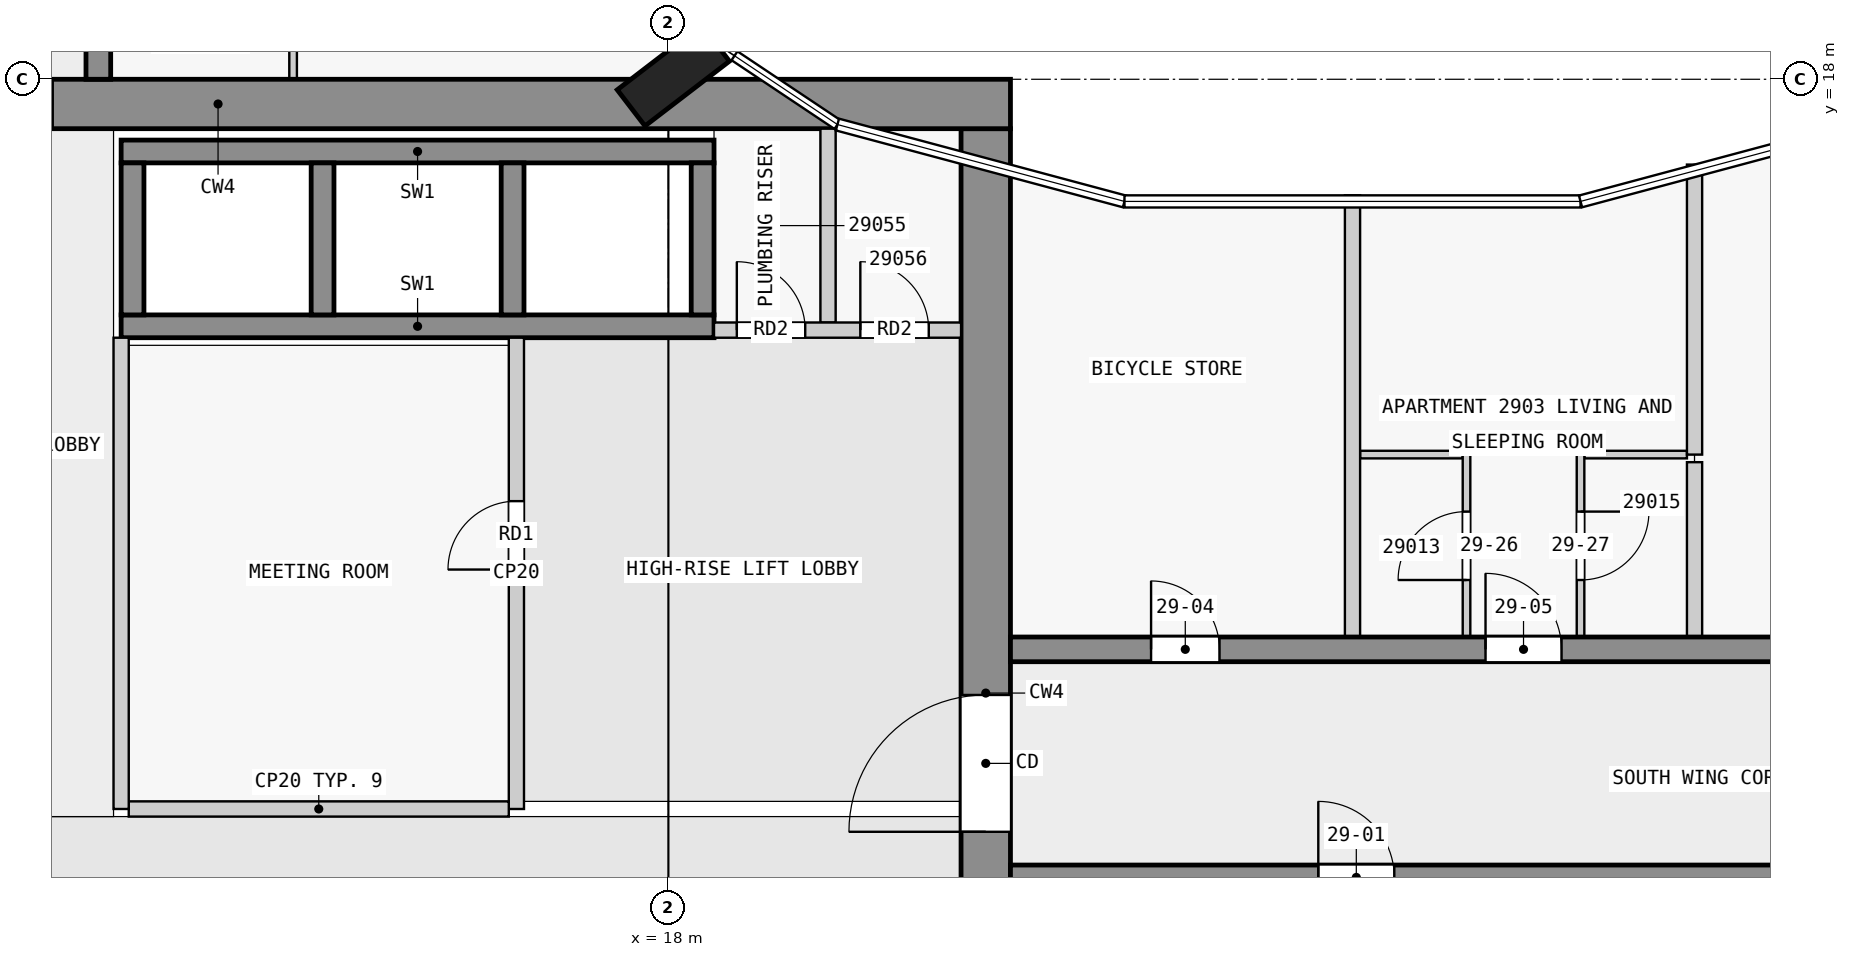
"""IFC4 building model, lengths in metres.
Left out: names, types, materials, properties, quantities, classifications, styles, units other than length and angle.
Written with IfcOpenShell. Run it as: python <this file> out.ifc"""

import sys

from ifc_helpers import new_model, si_unit, direction, frame, frame_2d, origin, origin_2d, place, context, subcontext, project, spatial, rectangle, extrude, element, fill, save


model = new_model("IFC4")
c1 = context("Model", 3, precision=1e-05, world=origin(), true_north=direction((0.0, 1.0)))
c2 = subcontext(c1, "Body", "Model", "MODEL_VIEW")
j1 = project(units=[si_unit("LENGTHUNIT", "METRE"), si_unit("PLANEANGLEUNIT", "RADIAN")], contexts=[c1])
p1 = place(None, origin())
s1 = spatial("IfcSite", under=j1, at=p1, CompositionType="ELEMENT")
p2 = place(p1, origin())
s2 = spatial("IfcBuilding", under=s1, at=p2, CompositionType="ELEMENT")
p3 = place(p2, frame((0.0, 0.0, 113.3)))
s3 = spatial("IfcBuildingStorey", under=s2, at=p3, CompositionType="ELEMENT", Elevation=113.3)
p4 = place(p3, frame((18.065, 18.05, 0.0), z_axis=(0.0, 0.0, 1.0), x_axis=(-0.608810846443, 0.793315418515, 0.0)))
e1 = element("IfcColumn", 1, at=p4, inside=s3, PredefinedType="COLUMN", context=c2, shape_type="SweptSolid", body=[
    extrude(rectangle(XDim=0.6, YDim=1.4, at=origin_2d()), origin(), (0.0, 0.0, 1.0), 3.5),
])
p5 = place(p3, frame((1.65, 17.675, 0.0), z_axis=(0.0, 0.0, 1.0), x_axis=(1.0, 0.0, 0.0)))
e2 = element("IfcWall", 2, at=p5, inside=s3, PredefinedType="SHEAR", context=c2, shape_type="SweptSolid", body=[
    extrude(rectangle(XDim=20.85, YDim=0.65, at=frame_2d((10.425, 0.0))), origin(), (0.0, 0.0, 1.0), 3.25),
])
p6 = place(p5, frame((6.45, 0.0, 0.0)))
e3 = element("IfcOpeningElement", 3, at=p6, cuts=e2, PredefinedType="OPENING", context=c2, shape_type="SweptSolid", body=[
    extrude(rectangle(XDim=1.8, YDim=2.1, at=frame_2d((0.9, 1.05))), frame((0.0, 0.335, 0.0), z_axis=(0.0, -1.0, 0.0), x_axis=(1.0, 0.0, 0.0)), (0.0, 0.0, 1.0), 0.67),
])
p7 = place(p3, frame((22.175, 2.5, 0.0), z_axis=(0.0, 0.0, 1.0), x_axis=(0.0, 1.0, 0.0)))
e4 = element("IfcWall", 4, at=p7, inside=s3, PredefinedType="SHEAR", context=c2, shape_type="SweptSolid", body=[
    extrude(rectangle(XDim=14.85, YDim=0.65, at=frame_2d((7.425, 0.0))), origin(), (0.0, 0.0, 1.0), 3.25),
])
p8 = place(p7, frame((5.6, 0.0, 0.0)))
e5 = element("IfcOpeningElement", 5, at=p8, cuts=e4, PredefinedType="OPENING", context=c2, shape_type="SweptSolid", body=[
    extrude(rectangle(XDim=1.8, YDim=2.1, at=frame_2d((0.9, 1.05))), frame((0.0, 0.335, 0.0), z_axis=(0.0, -1.0, 0.0), x_axis=(1.0, 0.0, 0.0)), (0.0, 0.0, 1.0), 0.67),
])
for number, where, z_axis, x_axis in (
    (6, (10.8, 17.05, 0.0), (0.0, 0.0, 1.0), (1.0, 0.0, 0.0)),
    (7, (10.8, 14.75, 0.0), (0.0, 0.0, 1.0), (1.0, 0.0, 0.0)),
):
    element("IfcWall", number, at=place(p3, frame(where, z_axis=z_axis, x_axis=x_axis)), inside=s3, PredefinedType="SHEAR", context=c2, shape_type="SweptSolid", body=[
        extrude(rectangle(XDim=7.8, YDim=0.3, at=frame_2d((3.9, 0.0))), origin(), (0.0, 0.0, 1.0), 3.25),
    ])
for number, where, z_axis, x_axis in (
    (8, (10.95, 14.9, 0.0), (0.0, 0.0, 1.0), (0.0, 1.0, 0.0)),
    (9, (13.45, 14.9, 0.0), (0.0, 0.0, 1.0), (0.0, 1.0, 0.0)),
    (10, (15.95, 14.9, 0.0), (0.0, 0.0, 1.0), (0.0, 1.0, 0.0)),
    (11, (18.45, 14.9, 0.0), (0.0, 0.0, 1.0), (0.0, 1.0, 0.0)),
):
    element("IfcWall", number, at=place(p3, frame(where, z_axis=z_axis, x_axis=x_axis)), inside=s3, PredefinedType="SHEAR", context=c2, shape_type="SweptSolid", body=[
        extrude(rectangle(XDim=2.0, YDim=0.3, at=frame_2d((1.0, 0.0))), origin(), (0.0, 0.0, 1.0), 3.25),
    ])
p9 = place(p3, frame((22.5, 7.5, 0.0), z_axis=(0.0, 0.0, 1.0), x_axis=(1.0, 0.0, 0.0)))
e12 = element("IfcWall", 12, at=p9, inside=s3, PredefinedType="SHEAR", context=c2, shape_type="SweptSolid", body=[
    extrude(rectangle(XDim=22.5, YDim=0.325, at=frame_2d((11.25, 0.0))), origin(), (0.0, 0.0, 1.0), 3.25),
])
p10 = place(p9, frame((4.05, 0.0, 0.0)))
e13 = element("IfcOpeningElement", 13, at=p10, cuts=e12, PredefinedType="OPENING", context=c2, shape_type="SweptSolid", body=[
    extrude(rectangle(XDim=1.0, YDim=2.1, at=frame_2d((0.5, 1.05))), frame((0.0, 0.172, 0.0), z_axis=(0.0, -1.0, 0.0), x_axis=(1.0, 0.0, 0.0)), (0.0, 0.0, 1.0), 0.345),
])
p11 = place(p9, frame((10.75, 0.0, 0.0)))
e14 = element("IfcOpeningElement", 14, at=p11, cuts=e12, PredefinedType="OPENING", context=c2, shape_type="SweptSolid", body=[
    extrude(rectangle(XDim=1.0, YDim=2.1, at=frame_2d((0.5, 1.05))), frame((0.0, 0.172, 0.0), z_axis=(0.0, -1.0, 0.0), x_axis=(1.0, 0.0, 0.0)), (0.0, 0.0, 1.0), 0.345),
])
p12 = place(p9, frame((16.85, 0.0, 0.0)))
e15 = element("IfcOpeningElement", 15, at=p12, cuts=e12, PredefinedType="OPENING", context=c2, shape_type="SweptSolid", body=[
    extrude(rectangle(XDim=1.0, YDim=2.1, at=frame_2d((0.5, 1.05))), frame((0.0, 0.172, 0.0), z_axis=(0.0, -1.0, 0.0), x_axis=(1.0, 0.0, 0.0)), (0.0, 0.0, 1.0), 0.345),
])
p13 = place(p3, frame((22.5, 10.5, 0.0), z_axis=(0.0, 0.0, 1.0), x_axis=(1.0, 0.0, 0.0)))
e16 = element("IfcWall", 16, at=p13, inside=s3, PredefinedType="SHEAR", context=c2, shape_type="SweptSolid", body=[
    extrude(rectangle(XDim=22.5, YDim=0.325, at=frame_2d((11.25, 0.0))), origin(), (0.0, 0.0, 1.0), 3.25),
])
p14 = place(p13, frame((1.85, 0.0, 0.0)))
e17 = element("IfcOpeningElement", 17, at=p14, cuts=e16, PredefinedType="OPENING", context=c2, shape_type="SweptSolid", body=[
    extrude(rectangle(XDim=0.9, YDim=2.1, at=frame_2d((0.45, 1.05))), frame((0.0, 0.172, 0.0), z_axis=(0.0, -1.0, 0.0), x_axis=(1.0, 0.0, 0.0)), (0.0, 0.0, 1.0), 0.345),
])
p15 = place(p13, frame((6.25, 0.0, 0.0)))
e18 = element("IfcOpeningElement", 18, at=p15, cuts=e16, PredefinedType="OPENING", context=c2, shape_type="SweptSolid", body=[
    extrude(rectangle(XDim=1.0, YDim=2.1, at=frame_2d((0.5, 1.05))), frame((0.0, 0.172, 0.0), z_axis=(0.0, -1.0, 0.0), x_axis=(1.0, 0.0, 0.0)), (0.0, 0.0, 1.0), 0.345),
])
p16 = place(p13, frame((13.05, 0.0, 0.0)))
e19 = element("IfcOpeningElement", 19, at=p16, cuts=e16, PredefinedType="OPENING", context=c2, shape_type="SweptSolid", body=[
    extrude(rectangle(XDim=1.0, YDim=2.1, at=frame_2d((0.5, 1.05))), frame((0.0, 0.172, 0.0), z_axis=(0.0, -1.0, 0.0), x_axis=(1.0, 0.0, 0.0)), (0.0, 0.0, 1.0), 0.345),
])
p17 = place(p13, frame((18.75, 0.0, 0.0)))
e20 = element("IfcOpeningElement", 20, at=p17, cuts=e16, PredefinedType="OPENING", context=c2, shape_type="SweptSolid", body=[
    extrude(rectangle(XDim=0.9, YDim=2.1, at=frame_2d((0.45, 1.05))), frame((0.0, 0.172, 0.0), z_axis=(0.0, -1.0, 0.0), x_axis=(1.0, 0.0, 0.0)), (0.0, 0.0, 1.0), 0.345),
])
p18 = place(p13, frame((20.95, 0.0, 0.0)))
e21 = element("IfcOpeningElement", 21, at=p18, cuts=e16, PredefinedType="OPENING", context=c2, shape_type="SweptSolid", body=[
    extrude(rectangle(XDim=1.0, YDim=2.1, at=frame_2d((0.5, 1.05))), frame((0.0, 0.172, 0.0), z_axis=(0.0, -1.0, 0.0), x_axis=(1.0, 0.0, 0.0)), (0.0, 0.0, 1.0), 0.345),
])
p19 = place(p3, frame((10.5, 18.0, 0.0), z_axis=(0.0, 0.0, 1.0), x_axis=(0.0, 1.0, 0.0)))
e22 = element("IfcWall", 22, at=p19, inside=s3, PredefinedType="SHEAR", context=c2, shape_type="SweptSolid", body=[
    extrude(rectangle(XDim=27.0, YDim=0.325, at=frame_2d((13.5, 0.0))), origin(), (0.0, 0.0, 1.0), 3.25),
])
p20 = place(p19, frame((1.75, 0.0, 0.0)))
e23 = element("IfcOpeningElement", 23, at=p20, cuts=e22, PredefinedType="OPENING", context=c2, shape_type="SweptSolid", body=[
    extrude(rectangle(XDim=1.0, YDim=2.1, at=frame_2d((0.5, 1.05))), frame((0.0, 0.172, 0.0), z_axis=(0.0, -1.0, 0.0), x_axis=(1.0, 0.0, 0.0)), (0.0, 0.0, 1.0), 0.345),
])
p21 = place(p19, frame((8.55, 0.0, 0.0)))
e24 = element("IfcOpeningElement", 24, at=p21, cuts=e22, PredefinedType="OPENING", context=c2, shape_type="SweptSolid", body=[
    extrude(rectangle(XDim=1.0, YDim=2.1, at=frame_2d((0.5, 1.05))), frame((0.0, 0.172, 0.0), z_axis=(0.0, -1.0, 0.0), x_axis=(1.0, 0.0, 0.0)), (0.0, 0.0, 1.0), 0.345),
])
p22 = place(p19, frame((15.35, 0.0, 0.0)))
e25 = element("IfcOpeningElement", 25, at=p22, cuts=e22, PredefinedType="OPENING", context=c2, shape_type="SweptSolid", body=[
    extrude(rectangle(XDim=0.9, YDim=2.1, at=frame_2d((0.45, 1.05))), frame((0.0, 0.172, 0.0), z_axis=(0.0, -1.0, 0.0), x_axis=(1.0, 0.0, 0.0)), (0.0, 0.0, 1.0), 0.345),
])
p23 = place(p19, frame((19.75, 0.0, 0.0)))
e26 = element("IfcOpeningElement", 26, at=p23, cuts=e22, PredefinedType="OPENING", context=c2, shape_type="SweptSolid", body=[
    extrude(rectangle(XDim=1.0, YDim=2.1, at=frame_2d((0.5, 1.05))), frame((0.0, 0.172, 0.0), z_axis=(0.0, -1.0, 0.0), x_axis=(1.0, 0.0, 0.0)), (0.0, 0.0, 1.0), 0.345),
])
p24 = place(p19, frame((23.25, 0.0, 0.0)))
e27 = element("IfcOpeningElement", 27, at=p24, cuts=e22, PredefinedType="OPENING", context=c2, shape_type="SweptSolid", body=[
    extrude(rectangle(XDim=0.9, YDim=2.1, at=frame_2d((0.45, 1.05))), frame((0.0, 0.172, 0.0), z_axis=(0.0, -1.0, 0.0), x_axis=(1.0, 0.0, 0.0)), (0.0, 0.0, 1.0), 0.345),
])
p25 = place(p19, frame((25.45, 0.0, 0.0)))
e28 = element("IfcOpeningElement", 28, at=p25, cuts=e22, PredefinedType="OPENING", context=c2, shape_type="SweptSolid", body=[
    extrude(rectangle(XDim=1.0, YDim=2.1, at=frame_2d((0.5, 1.05))), frame((0.0, 0.172, 0.0), z_axis=(0.0, -1.0, 0.0), x_axis=(1.0, 0.0, 0.0)), (0.0, 0.0, 1.0), 0.345),
])
p26 = place(p3, frame((10.8, 8.4, 0.0), z_axis=(0.0, 0.0, 1.0), x_axis=(0.0, 1.0, 0.0)))
e29 = element("IfcWall", 29, at=p26, inside=s3, PredefinedType="PARTITIONING", context=c2, shape_type="SweptSolid", body=[
    extrude(rectangle(XDim=6.2, YDim=0.2, at=frame_2d((3.1, 0.0))), origin(), (0.0, 0.0, 1.0), 3.25),
])
p27 = place(p3, frame((10.9, 8.4, 0.0), z_axis=(0.0, 0.0, 1.0), x_axis=(1.0, 0.0, 0.0)))
e30 = element("IfcWall", 30, at=p27, inside=s3, PredefinedType="PARTITIONING", context=c2, shape_type="SweptSolid", body=[
    extrude(rectangle(XDim=5.0, YDim=0.2, at=frame_2d((2.5, 0.0))), origin(), (0.0, 0.0, 1.0), 3.25),
])
p28 = place(p3, frame((16.0, 8.4, 0.0), z_axis=(0.0, 0.0, 1.0), x_axis=(0.0, 1.0, 0.0)))
e31 = element("IfcWall", 31, at=p28, inside=s3, PredefinedType="PARTITIONING", context=c2, shape_type="SweptSolid", body=[
    extrude(rectangle(XDim=6.2, YDim=0.2, at=frame_2d((3.1, 0.0))), origin(), (0.0, 0.0, 1.0), 3.25),
])
p29 = place(p28, frame((3.15, 0.0, 0.0)))
e32 = element("IfcOpeningElement", 32, at=p29, cuts=e31, PredefinedType="OPENING", context=c2, shape_type="SweptSolid", body=[
    extrude(rectangle(XDim=0.9, YDim=2.1, at=frame_2d((0.45, 1.05))), frame((0.0, 0.11, 0.0), z_axis=(0.0, -1.0, 0.0), x_axis=(1.0, 0.0, 0.0)), (0.0, 0.0, 1.0), 0.22),
])
p30 = place(p3, frame((18.6, 14.7, 0.0), z_axis=(0.0, 0.0, 1.0), x_axis=(1.0, 0.0, 0.0)))
e33 = element("IfcWall", 33, at=p30, inside=s3, PredefinedType="PARTITIONING", context=c2, shape_type="SweptSolid", body=[
    extrude(rectangle(XDim=3.25, YDim=0.2, at=frame_2d((1.625, 0.0))), origin(), (0.0, 0.0, 1.0), 3.25),
])
p31 = place(p30, frame((0.3, 0.0, 0.0)))
e34 = element("IfcOpeningElement", 34, at=p31, cuts=e33, PredefinedType="OPENING", context=c2, shape_type="SweptSolid", body=[
    extrude(rectangle(XDim=0.9, YDim=2.1, at=frame_2d((0.45, 1.05))), frame((0.0, 0.11, 0.0), z_axis=(0.0, -1.0, 0.0), x_axis=(1.0, 0.0, 0.0)), (0.0, 0.0, 1.0), 0.22),
])
p32 = place(p30, frame((1.925, 0.0, 0.0)))
e35 = element("IfcOpeningElement", 35, at=p32, cuts=e33, PredefinedType="OPENING", context=c2, shape_type="SweptSolid", body=[
    extrude(rectangle(XDim=0.9, YDim=2.1, at=frame_2d((0.45, 1.05))), frame((0.0, 0.11, 0.0), z_axis=(0.0, -1.0, 0.0), x_axis=(1.0, 0.0, 0.0)), (0.0, 0.0, 1.0), 0.22),
])
p33 = place(p3, frame((20.1, 14.8, 0.0), z_axis=(0.0, 0.0, 1.0), x_axis=(0.0, 1.0, 0.0)))
e36 = element("IfcWall", 36, at=p33, inside=s3, PredefinedType="PARTITIONING", context=c2, shape_type="SweptSolid", body=[
    extrude(rectangle(XDim=2.55, YDim=0.2, at=frame_2d((1.275, 0.0))), origin(), (0.0, 0.0, 1.0), 3.25),
])
for number, where, z_axis, x_axis in (
    (37, (28.45, 13.062, 0.0), (0.0, 0.0, 1.0), (-1.0, 0.0, 0.0)),
    (38, (31.4, 13.062, 0.0), (0.0, 0.0, 1.0), (-1.0, 0.0, 0.0)),
):
    element("IfcWall", number, at=place(p3, frame(where, z_axis=z_axis, x_axis=x_axis)), inside=s3, PredefinedType="PARTITIONING", context=c2, shape_type="SweptSolid", body=[
        extrude(rectangle(XDim=1.35, YDim=0.1, at=frame_2d((0.675, 0.0))), origin(), (0.0, 0.0, 1.0), 3.25),
    ])
p34 = place(p3, frame((13.062, 18.0, 0.0), z_axis=(0.0, 0.0, 1.0), x_axis=(0.0, 1.0, 0.0)))
e39 = element("IfcWall", 39, at=p34, inside=s3, PredefinedType="PARTITIONING", context=c2, shape_type="SweptSolid", body=[
    extrude(rectangle(XDim=1.45, YDim=0.1, at=frame_2d((0.725, 0.0))), origin(), (0.0, 0.0, 1.0), 3.25),
])
p35 = place(p3, frame((27.0, 10.663, 0.0), z_axis=(0.0, 0.0, 1.0), x_axis=(0.0, 1.0, 0.0)))
e40 = element("IfcWall", 40, at=p35, inside=s3, PredefinedType="PARTITIONING", context=c2, shape_type="SweptSolid", body=[
    extrude(rectangle(XDim=5.811, YDim=0.2, at=frame_2d((2.905, 0.0))), origin(), (0.0, 0.0, 1.0), 3.25),
])
p36 = place(p3, frame((28.5, 10.663, 0.0), z_axis=(0.0, 0.0, 1.0), x_axis=(0.0, 1.0, 0.0)))
e41 = element("IfcWall", 41, at=p36, inside=s3, PredefinedType="PARTITIONING", context=c2, shape_type="SweptSolid", body=[
    extrude(rectangle(XDim=2.4, YDim=0.1, at=frame_2d((1.2, 0.0))), origin(), (0.0, 0.0, 1.0), 3.25),
])
p37 = place(p36, frame((0.75, 0.0, 0.0)))
e42 = element("IfcOpeningElement", 42, at=p37, cuts=e41, PredefinedType="OPENING", context=c2, shape_type="SweptSolid", body=[
    extrude(rectangle(XDim=0.9, YDim=2.1, at=frame_2d((0.45, 1.05))), frame((0.0, 0.06, 0.0), z_axis=(0.0, -1.0, 0.0), x_axis=(1.0, 0.0, 0.0)), (0.0, 0.0, 1.0), 0.12),
])
p38 = place(p3, frame((30.0, 13.062, 0.0), z_axis=(0.0, 0.0, 1.0), x_axis=(0.0, -1.0, 0.0)))
e43 = element("IfcWall", 43, at=p38, inside=s3, PredefinedType="PARTITIONING", context=c2, shape_type="SweptSolid", body=[
    extrude(rectangle(XDim=2.4, YDim=0.1, at=frame_2d((1.2, 0.0))), origin(), (0.0, 0.0, 1.0), 3.25),
])
p39 = place(p38, frame((0.75, 0.0, 0.0)))
e44 = element("IfcOpeningElement", 44, at=p39, cuts=e43, PredefinedType="OPENING", context=c2, shape_type="SweptSolid", body=[
    extrude(rectangle(XDim=0.9, YDim=2.1, at=frame_2d((0.45, 1.05))), frame((0.0, 0.06, 0.0), z_axis=(0.0, -1.0, 0.0), x_axis=(1.0, 0.0, 0.0)), (0.0, 0.0, 1.0), 0.12),
])
p40 = place(p3, frame((31.5, 16.878, 0.0), z_axis=(0.0, 0.0, 1.0), x_axis=(0.0, -1.0, 0.0)))
e45 = element("IfcWall", 45, at=p40, inside=s3, PredefinedType="PARTITIONING", context=c2, shape_type="SweptSolid", body=[
    extrude(rectangle(XDim=3.815, YDim=0.2, at=frame_2d((1.908, 0.0))), origin(), (0.0, 0.0, 1.0), 3.25),
])
p41 = place(p3, frame((31.5, 10.663, 0.0), z_axis=(0.0, 0.0, 1.0), x_axis=(0.0, 1.0, 0.0)))
e46 = element("IfcWall", 46, at=p41, inside=s3, PredefinedType="PARTITIONING", context=c2, shape_type="SweptSolid", body=[
    extrude(rectangle(XDim=2.3, YDim=0.2, at=frame_2d((1.15, 0.0))), origin(), (0.0, 0.0, 1.0), 3.25),
])
p42 = place(p29, origin())
e47 = element("IfcDoor", 47, at=p42, inside=s3, OperationType="SINGLE_SWING_LEFT", PredefinedType="DOOR", context=c2, shape_type="SweptSolid", body=[
    extrude(rectangle(XDim=0.9, YDim=2.1, at=frame_2d((0.45, 1.05))), frame((0.0, 0.025, 0.0), z_axis=(0.0, -1.0, 0.0), x_axis=(1.0, 0.0, 0.0)), (0.0, 0.0, 1.0), 0.05),
])
fill(e32, e47)
p43 = place(p8, origin())
e48 = element("IfcDoor", 48, at=p43, inside=s3, OperationType="DOUBLE_DOOR_SINGLE_SWING", PredefinedType="DOOR", context=c2, shape_type="SweptSolid", body=[
    extrude(rectangle(XDim=1.8, YDim=2.1, at=frame_2d((0.9, 1.05))), frame((0.0, 0.025, 0.0), z_axis=(0.0, -1.0, 0.0), x_axis=(1.0, 0.0, 0.0)), (0.0, 0.0, 1.0), 0.05),
])
fill(e5, e48)
p44 = place(p31, origin())
e49 = element("IfcDoor", 49, at=p44, inside=s3, OperationType="SINGLE_SWING_LEFT", PredefinedType="DOOR", context=c2, shape_type="SweptSolid", body=[
    extrude(rectangle(XDim=0.9, YDim=2.1, at=frame_2d((0.45, 1.05))), frame((0.0, 0.025, 0.0), z_axis=(0.0, -1.0, 0.0), x_axis=(1.0, 0.0, 0.0)), (0.0, 0.0, 1.0), 0.05),
])
fill(e34, e49)
p45 = place(p32, origin())
e50 = element("IfcDoor", 50, at=p45, inside=s3, OperationType="SINGLE_SWING_LEFT", PredefinedType="DOOR", context=c2, shape_type="SweptSolid", body=[
    extrude(rectangle(XDim=0.9, YDim=2.1, at=frame_2d((0.45, 1.05))), frame((0.0, 0.025, 0.0), z_axis=(0.0, -1.0, 0.0), x_axis=(1.0, 0.0, 0.0)), (0.0, 0.0, 1.0), 0.05),
])
fill(e35, e50)
p46 = place(p10, origin())
e51 = element("IfcDoor", 51, at=p46, inside=s3, OperationType="SINGLE_SWING_LEFT", PredefinedType="DOOR", context=c2, shape_type="SweptSolid", body=[
    extrude(rectangle(XDim=1.0, YDim=2.1, at=frame_2d((0.5, 1.05))), frame((0.0, 0.025, 0.0), z_axis=(0.0, -1.0, 0.0), x_axis=(1.0, 0.0, 0.0)), (0.0, 0.0, 1.0), 0.05),
])
fill(e13, e51)
p47 = place(p14, origin())
e52 = element("IfcDoor", 52, at=p47, inside=s3, OperationType="SINGLE_SWING_LEFT", PredefinedType="DOOR", context=c2, shape_type="SweptSolid", body=[
    extrude(rectangle(XDim=0.9, YDim=2.1, at=frame_2d((0.45, 1.05))), frame((0.0, 0.025, 0.0), z_axis=(0.0, -1.0, 0.0), x_axis=(1.0, 0.0, 0.0)), (0.0, 0.0, 1.0), 0.05),
])
fill(e17, e52)
p48 = place(p15, origin())
e53 = element("IfcDoor", 53, at=p48, inside=s3, OperationType="SINGLE_SWING_LEFT", PredefinedType="DOOR", context=c2, shape_type="SweptSolid", body=[
    extrude(rectangle(XDim=1.0, YDim=2.1, at=frame_2d((0.5, 1.05))), frame((0.0, 0.025, 0.0), z_axis=(0.0, -1.0, 0.0), x_axis=(1.0, 0.0, 0.0)), (0.0, 0.0, 1.0), 0.05),
])
fill(e18, e53)
p49 = place(p37, origin())
e54 = element("IfcDoor", 54, at=p49, inside=s3, OperationType="SINGLE_SWING_LEFT", PredefinedType="DOOR", context=c2, shape_type="SweptSolid", body=[
    extrude(rectangle(XDim=0.9, YDim=2.1, at=frame_2d((0.45, 1.05))), frame((0.0, 0.025, 0.0), z_axis=(0.0, -1.0, 0.0), x_axis=(1.0, 0.0, 0.0)), (0.0, 0.0, 1.0), 0.05),
])
fill(e42, e54)
p50 = place(p39, origin())
e55 = element("IfcDoor", 55, at=p50, inside=s3, OperationType="SINGLE_SWING_LEFT", PredefinedType="DOOR", context=c2, shape_type="SweptSolid", body=[
    extrude(rectangle(XDim=0.9, YDim=2.1, at=frame_2d((0.45, 1.05))), frame((0.0, 0.025, 0.0), z_axis=(0.0, -1.0, 0.0), x_axis=(1.0, 0.0, 0.0)), (0.0, 0.0, 1.0), 0.05),
])
fill(e44, e55)
save(model, sys.argv[1])
